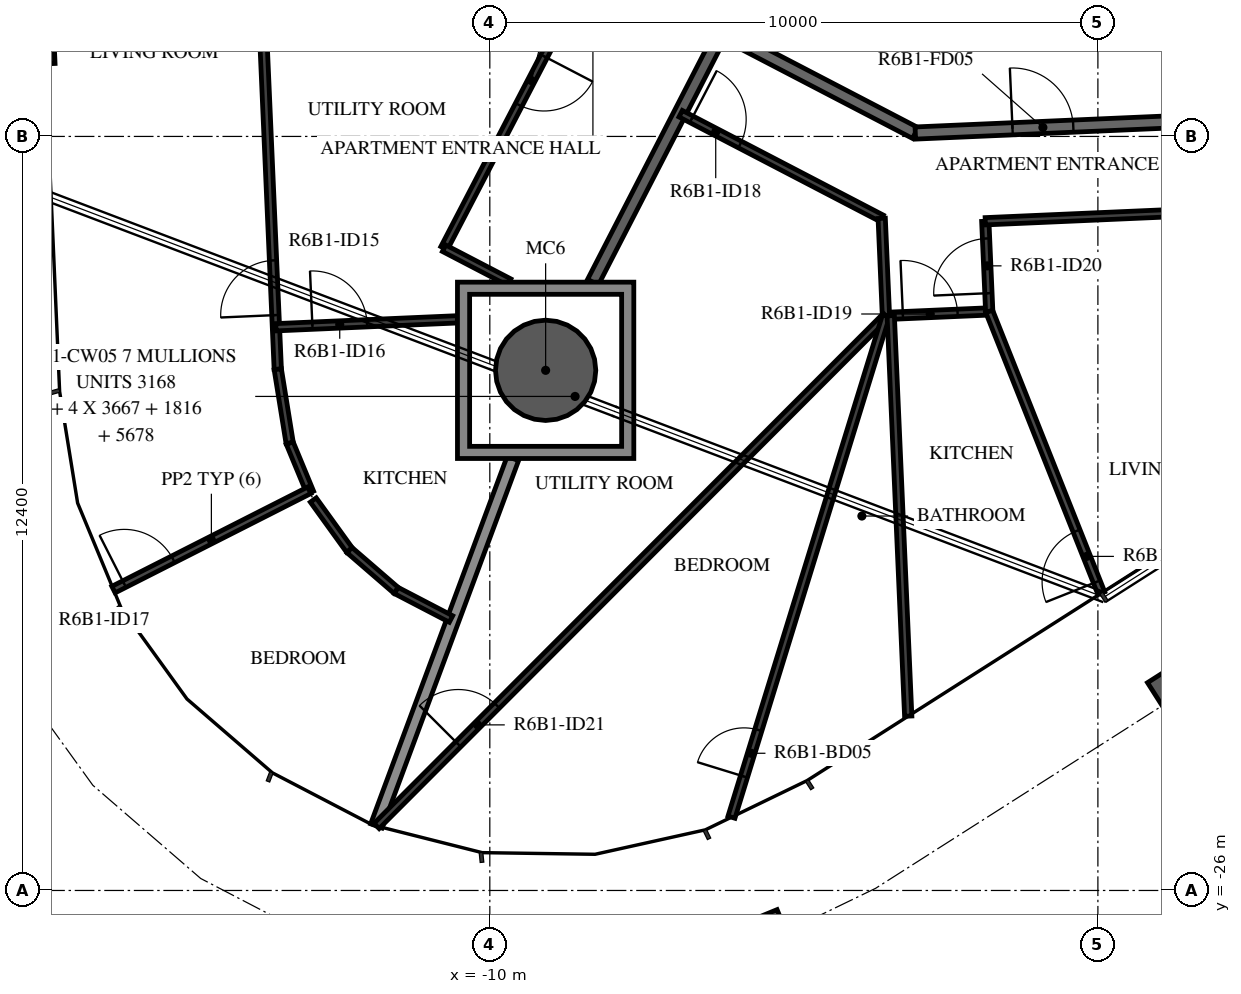
"""IFC4 building model, lengths in metres.
Left out: names, types, materials, properties, quantities, classifications, styles, units other than length and angle.
Written with IfcOpenShell. Run it as: python <this file> out.ifc"""

import sys

from ifc_helpers import new_model, si_unit, direction, frame, frame_2d, origin, origin_2d, place, context, subcontext, project, spatial, polyline, rectangle, hollow_circle, i_section, outline, extrude, element, fill, save


model = new_model("IFC4")
c1 = context("Model", 3, precision=1e-05, world=origin(), true_north=direction((0.0, 1.0)))
c2 = subcontext(c1, "Body", "Model", "MODEL_VIEW")
j1 = project(units=[si_unit("LENGTHUNIT", "METRE"), si_unit("PLANEANGLEUNIT", "RADIAN")], contexts=[c1])
p1 = place(None, origin())
s1 = spatial("IfcSite", under=j1, at=p1, CompositionType="ELEMENT")
p2 = place(p1, origin())
s2 = spatial("IfcBuilding", under=s1, at=p2, CompositionType="ELEMENT")
p3 = place(p2, frame((0.0, 0.0, 237.2)))
s3 = spatial("IfcBuildingStorey", under=s2, at=p3, CompositionType="ELEMENT", Elevation=237.2)
p4 = place(p3, frame((-9.082, -17.446, -0.38), z_axis=(0.0, 0.0, 1.0), x_axis=(1.0, 0.0, 0.0)))
e1 = element("IfcColumn", 1, at=p4, inside=s3, PredefinedType="COLUMN", context=c2, shape_type="SweptSolid", body=[
    extrude(hollow_circle(Radius=0.825, WallThickness=0.04, at=origin_2d()), origin(), (0.0, 0.0, 1.0), 3.5),
])
for number, where, z_axis, x_axis in (
    (2, (-5.243, -26.789, -0.38), (0.0, 0.0, 1.0), (-0.925, -0.38, 0.0)),
    (3, (1.185, -22.881, -0.38), (0.0, 0.0, 1.0), (-0.843, -0.537, 0.0)),
):
    element("IfcColumn", number, at=place(p3, frame(where, z_axis=z_axis, x_axis=x_axis)), inside=s3, PredefinedType="COLUMN", context=c2, shape_type="SweptSolid", body=[
        extrude(i_section(OverallWidth=0.3, OverallDepth=0.9, WebThickness=0.019, FlangeThickness=0.035, FilletRadius=0.03, at=origin_2d()), origin(), (0.0, 0.0, 1.0), 3.5),
    ])
p5 = place(p3, frame((-17.369, -9.207, 0.0), z_axis=(0.0, 0.0, 1.0), x_axis=(0.043639181999, -0.999047357133, 0.0)))
e4 = element("IfcWall", 4, at=p5, inside=s3, PredefinedType="STANDARD", context=c2, shape_type="SweptSolid", body=[
    extrude(rectangle(XDim=3.2, YDim=0.16, at=frame_2d((1.6, 0.0))), origin(), (0.0, 0.0, 1.0), 3.12),
])
p6 = place(p5, frame((0.4, 0.0, 0.0)))
e5 = element("IfcOpeningElement", 5, at=p6, cuts=e4, PredefinedType="OPENING", context=c2, shape_type="SweptSolid", body=[
    extrude(rectangle(XDim=2.4, YDim=2.4, at=frame_2d((1.2, 1.2))), frame((0.0, 0.09, 0.0), z_axis=(0.0, -1.0, 0.0), x_axis=(1.0, 0.0, 0.0)), (0.0, 0.0, 1.0), 0.18),
])
p7 = place(p3, frame((-9.372, -10.228, 0.0), z_axis=(0.0, 0.0, 1.0), x_axis=(0.887005184532, -0.461759464021, 0.0)))
e6 = element("IfcWall", 6, at=p7, inside=s3, PredefinedType="STANDARD", context=c2, shape_type="SweptSolid", body=[
    extrude(rectangle(XDim=7.181, YDim=0.2, at=frame_2d((3.591, 0.0))), origin(), (0.0, 0.0, 1.0), 3.12),
])
p8 = place(p7, frame((2.391, 0.0, 0.0)))
e7 = element("IfcOpeningElement", 7, at=p8, cuts=e6, PredefinedType="OPENING", context=c2, shape_type="SweptSolid", body=[
    extrude(rectangle(XDim=1.0, YDim=2.1, at=frame_2d((0.5, 1.05))), frame((0.0, 0.11, 0.0), z_axis=(0.0, -1.0, 0.0), x_axis=(1.0, 0.0, 0.0)), (0.0, 0.0, 1.0), 0.22),
])
p9 = place(p3, frame((-3.003, -13.544, 0.0), z_axis=(0.0, 0.0, 1.0), x_axis=(0.999048221872, 0.043619380718, 0.0)))
e8 = element("IfcWall", 8, at=p9, inside=s3, PredefinedType="STANDARD", context=c2, shape_type="SweptSolid", body=[
    extrude(rectangle(XDim=6.979, YDim=0.2, at=frame_2d((3.49, 0.0))), origin(), (0.0, 0.0, 1.0), 3.12),
])
p10 = place(p9, frame((1.6, 0.0, 0.0)))
e9 = element("IfcOpeningElement", 9, at=p10, cuts=e8, PredefinedType="OPENING", context=c2, shape_type="SweptSolid", body=[
    extrude(rectangle(XDim=1.0, YDim=2.1, at=frame_2d((0.5, 1.05))), frame((0.0, 0.11, 0.0), z_axis=(0.0, -1.0, 0.0), x_axis=(1.0, 0.0, 0.0)), (0.0, 0.0, 1.0), 0.22),
])
p11 = place(p3, frame((-8.303, -15.996, 0.0), z_axis=(0.0, 0.0, 1.0), x_axis=(0.457702371186, 0.889105471477, 0.0)))
e10 = element("IfcWall", 10, at=p11, inside=s3, PredefinedType="STANDARD", context=c2, shape_type="SweptSolid", body=[
    extrude(rectangle(XDim=4.623, YDim=0.2, at=frame_2d((2.312, 0.0))), origin(), (0.0, 0.0, 1.0), 3.12),
])
p12 = place(p3, frame((-11.865, -24.939, 0.0), z_axis=(0.0, 0.0, 1.0), x_axis=(0.348245485283, 0.937403372076, 0.0)))
e11 = element("IfcWall", 11, at=p12, inside=s3, PredefinedType="STANDARD", context=c2, shape_type="SweptSolid", body=[
    extrude(rectangle(XDim=6.446, YDim=0.2, at=frame_2d((3.223, 0.0))), origin(), (0.0, 0.0, 1.0), 2.73),
])
p13 = place(p3, frame((-13.487, -17.429, 0.0), z_axis=(0.0, 0.0, 1.0), x_axis=(-0.043617336945, 0.999048311103, 0.0)))
e12 = element("IfcWall", 12, at=p13, inside=s3, PredefinedType="PARTITIONING", context=c2, shape_type="SweptSolid", body=[
    extrude(rectangle(XDim=12.941, YDim=0.12, at=frame_2d((6.47, 0.0))), origin(), (0.0, 0.0, 1.0), 3.12),
])
p14 = place(p13, frame((10.749, 0.0, 0.0)))
e13 = element("IfcOpeningElement", 13, at=p14, cuts=e12, PredefinedType="OPENING", context=c2, shape_type="SweptSolid", body=[
    extrude(rectangle(XDim=0.9, YDim=2.1, at=frame_2d((0.45, 1.05))), frame((0.0, 0.07, 0.0), z_axis=(0.0, -1.0, 0.0), x_axis=(1.0, 0.0, 0.0)), (0.0, 0.0, 1.0), 0.14),
])
p15 = place(p13, frame((0.892, 0.0, 0.0)))
e14 = element("IfcOpeningElement", 14, at=p15, cuts=e12, PredefinedType="OPENING", context=c2, shape_type="SweptSolid", body=[
    extrude(rectangle(XDim=0.9, YDim=2.1, at=frame_2d((0.45, 1.05))), frame((0.0, 0.07, 0.0), z_axis=(0.0, -1.0, 0.0), x_axis=(1.0, 0.0, 0.0)), (0.0, 0.0, 1.0), 0.14),
])
p16 = place(p3, frame((-9.016, -12.104, 0.0), z_axis=(0.0, 0.0, 1.0), x_axis=(-0.4617534789, -0.887008300256, 0.0)))
e15 = element("IfcWall", 15, at=p16, inside=s3, PredefinedType="PARTITIONING", context=c2, shape_type="SweptSolid", body=[
    extrude(rectangle(XDim=3.759, YDim=0.12, at=frame_2d((1.88, 0.0))), origin(), (0.0, 0.0, 1.0), 3.12),
])
p17 = place(p16, frame((0.2, 0.0, 0.0)))
e16 = element("IfcOpeningElement", 16, at=p17, cuts=e15, PredefinedType="OPENING", context=c2, shape_type="SweptSolid", body=[
    extrude(rectangle(XDim=0.9, YDim=2.1, at=frame_2d((0.45, 1.05))), frame((0.0, 0.07, 0.0), z_axis=(0.0, -1.0, 0.0), x_axis=(1.0, 0.0, 0.0)), (0.0, 0.0, 1.0), 0.14),
])
p18 = place(p3, frame((-10.752, -15.439, 0.0), z_axis=(0.0, 0.0, 1.0), x_axis=(0.887031383626, -0.461709134048, 0.0)))
e17 = element("IfcWall", 17, at=p18, inside=s3, PredefinedType="PARTITIONING", context=c2, shape_type="SweptSolid", body=[
    extrude(rectangle(XDim=1.208, YDim=0.12, at=frame_2d((0.604, 0.0))), origin(), (0.0, 0.0, 1.0), 3.12),
])
p19 = place(p3, frame((-12.954, -19.456, 0.0), z_axis=(0.0, 0.0, 1.0), x_axis=(-0.382807777256, 0.923828017367, 0.0)))
e18 = element("IfcWall", 18, at=p19, inside=s3, PredefinedType="PARTITIONING", context=c2, shape_type="SweptSolid", body=[
    extrude(rectangle(XDim=0.883, YDim=0.12, at=frame_2d((0.441, 0.0))), origin(), (0.0, 0.0, 1.0), 3.12),
])
p20 = place(p3, frame((-13.292, -18.64, 0.0), z_axis=(0.0, 0.0, 1.0), x_axis=(-0.159363796836, 0.98721992497, 0.0)))
e19 = element("IfcWall", 19, at=p20, inside=s3, PredefinedType="PARTITIONING", context=c2, shape_type="SweptSolid", body=[
    extrude(rectangle(XDim=1.227, YDim=0.12, at=frame_2d((0.614, 0.0))), origin(), (0.0, 0.0, 1.0), 3.12),
])
p21 = place(p3, frame((-16.189, -21.052, 0.0), z_axis=(0.0, 0.0, 1.0), x_axis=(0.891801938239, 0.452426019316, 0.0)))
e20 = element("IfcWall", 20, at=p21, inside=s3, PredefinedType="PARTITIONING", context=c2, shape_type="SweptSolid", body=[
    extrude(rectangle(XDim=3.611, YDim=0.12, at=frame_2d((1.805, 0.0))), origin(), (0.0, 0.0, 1.0), 2.73),
])
p22 = place(p21, frame((0.2, 0.0, 0.0)))
e21 = element("IfcOpeningElement", 21, at=p22, cuts=e20, PredefinedType="OPENING", context=c2, shape_type="SweptSolid", body=[
    extrude(rectangle(XDim=0.9, YDim=2.1, at=frame_2d((0.45, 1.05))), frame((0.0, 0.07, 0.0), z_axis=(0.0, -1.0, 0.0), x_axis=(1.0, 0.0, 0.0)), (0.0, 0.0, 1.0), 0.14),
])
p23 = place(p3, frame((-13.517, -16.738, 0.0), z_axis=(0.0, 0.0, 1.0), x_axis=(0.999047660155, 0.043632244256, 0.0)))
e22 = element("IfcWall", 22, at=p23, inside=s3, PredefinedType="PARTITIONING", context=c2, shape_type="SweptSolid", body=[
    extrude(rectangle(XDim=2.988, YDim=0.12, at=frame_2d((1.494, 0.0))), origin(), (0.0, 0.0, 1.0), 3.12),
])
p24 = place(p23, frame((0.6, 0.0, 0.0)))
e23 = element("IfcOpeningElement", 23, at=p24, cuts=e22, PredefinedType="OPENING", context=c2, shape_type="SweptSolid", body=[
    extrude(rectangle(XDim=0.9, YDim=2.1, at=frame_2d((0.45, 1.05))), frame((0.0, 0.07, 0.0), z_axis=(0.0, -1.0, 0.0), x_axis=(1.0, 0.0, 0.0)), (0.0, 0.0, 1.0), 0.14),
])
for number, where, z_axis, x_axis in (
    (24, (-12.903, -19.579, 0.0), (0.0, 0.0, 1.0), (0.585, -0.811, 0.0)),
    (25, (-12.308, -20.402, 0.0), (0.0, 0.0, 1.0), (0.757, -0.654, 0.0)),
    (26, (-11.539, -21.067, 0.0), (0.0, 0.0, 1.0), (0.887, -0.462, 0.0)),
):
    element("IfcWall", number, at=place(p3, frame(where, z_axis=z_axis, x_axis=x_axis)), inside=s3, PredefinedType="PARTITIONING", context=c2, shape_type="SweptSolid", body=[
        extrude(rectangle(XDim=1.016, YDim=0.12, at=frame_2d((0.508, 0.0))), origin(), (0.0, 0.0, 1.0), 3.12),
    ])
p25 = place(p3, frame((-6.861, -13.226, 0.0), z_axis=(0.0, 0.0, 1.0), x_axis=(0.887010791097, -0.461748694073, 0.0)))
e27 = element("IfcWall", 27, at=p25, inside=s3, PredefinedType="PARTITIONING", context=c2, shape_type="SweptSolid", body=[
    extrude(rectangle(XDim=3.727, YDim=0.12, at=frame_2d((1.864, 0.0))), origin(), (0.0, 0.0, 1.0), 3.12),
])
p26 = place(p25, frame((0.2, 0.0, 0.0)))
e28 = element("IfcOpeningElement", 28, at=p26, cuts=e27, PredefinedType="OPENING", context=c2, shape_type="SweptSolid", body=[
    extrude(rectangle(XDim=0.9, YDim=2.1, at=frame_2d((0.45, 1.05))), frame((0.0, 0.07, 0.0), z_axis=(0.0, -1.0, 0.0), x_axis=(1.0, 0.0, 0.0)), (0.0, 0.0, 1.0), 0.14),
])
p27 = place(p3, frame((-3.555, -14.947, 0.0), z_axis=(0.0, 0.0, 1.0), x_axis=(0.043470204022, -0.999054723908, 0.0)))
e29 = element("IfcWall", 29, at=p27, inside=s3, PredefinedType="PARTITIONING", context=c2, shape_type="SweptSolid", body=[
    extrude(rectangle(XDim=1.606, YDim=0.12, at=frame_2d((0.803, 0.0))), origin(), (0.0, 0.0, 1.0), 3.12),
])
p28 = place(p3, frame((-3.407, -16.548, 0.0), z_axis=(0.0, 0.0, 1.0), x_axis=(0.999045901572, 0.043672491929, 0.0)))
e30 = element("IfcWall", 30, at=p28, inside=s3, PredefinedType="PARTITIONING", context=c2, shape_type="SweptSolid", body=[
    extrude(rectangle(XDim=1.621, YDim=0.12, at=frame_2d((0.811, 0.0))), origin(), (0.0, 0.0, 1.0), 3.12),
])
p29 = place(p28, frame((0.2, 0.0, 0.0)))
e31 = element("IfcOpeningElement", 31, at=p29, cuts=e30, PredefinedType="OPENING", context=c2, shape_type="SweptSolid", body=[
    extrude(rectangle(XDim=0.9, YDim=2.1, at=frame_2d((0.45, 1.05))), frame((0.0, 0.07, 0.0), z_axis=(0.0, -1.0, 0.0), x_axis=(1.0, 0.0, 0.0)), (0.0, 0.0, 1.0), 0.14),
])
p30 = place(p3, frame((-1.787, -16.478, 0.0), z_axis=(0.0, 0.0, 1.0), x_axis=(-0.043601447011, 0.999049004713, 0.0)))
e32 = element("IfcWall", 32, at=p30, inside=s3, PredefinedType="PARTITIONING", context=c2, shape_type="SweptSolid", body=[
    extrude(rectangle(XDim=1.484, YDim=0.12, at=frame_2d((0.742, 0.0))), origin(), (0.0, 0.0, 1.0), 3.12),
])
p31 = place(p30, frame((0.3, 0.0, 0.0)))
e33 = element("IfcOpeningElement", 33, at=p31, cuts=e32, PredefinedType="OPENING", context=c2, shape_type="SweptSolid", body=[
    extrude(rectangle(XDim=0.9, YDim=2.1, at=frame_2d((0.45, 1.05))), frame((0.0, 0.07, 0.0), z_axis=(0.0, -1.0, 0.0), x_axis=(1.0, 0.0, 0.0)), (0.0, 0.0, 1.0), 0.14),
])
p32 = place(p3, frame((-1.852, -14.995, 0.0), z_axis=(0.0, 0.0, 1.0), x_axis=(0.999047773092, 0.043629658249, 0.0)))
e34 = element("IfcWall", 34, at=p32, inside=s3, PredefinedType="PARTITIONING", context=c2, shape_type="SweptSolid", body=[
    extrude(rectangle(XDim=6.497, YDim=0.12, at=frame_2d((3.248, 0.0))), origin(), (0.0, 0.0, 1.0), 3.12),
])
p33 = place(p3, frame((-11.862, -24.94, 0.0), z_axis=(0.0, 0.0, 1.0), x_axis=(0.70663293894, 0.707580306117, 0.0)))
e35 = element("IfcWall", 35, at=p33, inside=s3, PredefinedType="PARTITIONING", context=c2, shape_type="SweptSolid", body=[
    extrude(rectangle(XDim=11.854, YDim=0.12, at=frame_2d((5.927, 0.0))), origin(), (0.0, 0.0, 1.0), 3.12),
])
p34 = place(p33, frame((1.9, 0.0, 0.0)))
e36 = element("IfcOpeningElement", 36, at=p34, cuts=e35, PredefinedType="OPENING", context=c2, shape_type="SweptSolid", body=[
    extrude(rectangle(XDim=0.9, YDim=2.1, at=frame_2d((0.45, 1.05))), frame((0.0, 0.07, 0.0), z_axis=(0.0, -1.0, 0.0), x_axis=(1.0, 0.0, 0.0)), (0.0, 0.0, 1.0), 0.14),
])
p35 = place(p3, frame((-6.026, -24.795, 0.0), z_axis=(0.0, 0.0, 1.0), x_axis=(0.294501505058, 0.955651015548, 0.0)))
e37 = element("IfcWall", 37, at=p35, inside=s3, PredefinedType="PARTITIONING", context=c2, shape_type="SweptSolid", body=[
    extrude(rectangle(XDim=8.626, YDim=0.12, at=frame_2d((4.313, 0.0))), origin(), (0.0, 0.0, 1.0), 3.12),
])
p36 = place(p35, frame((0.7, 0.0, 0.0)))
e38 = element("IfcOpeningElement", 38, at=p36, cuts=e37, PredefinedType="OPENING", context=c2, shape_type="SweptSolid", body=[
    extrude(rectangle(XDim=0.8, YDim=2.1, at=frame_2d((0.4, 1.05))), frame((0.0, 0.07, 0.0), z_axis=(0.0, -1.0, 0.0), x_axis=(1.0, 0.0, 0.0)), (0.0, 0.0, 1.0), 0.14),
])
p37 = place(p3, frame((-3.119, -23.133, 0.0), z_axis=(0.0, 0.0, 1.0), x_axis=(-0.043633326708, 0.99904761288, 0.0)))
e39 = element("IfcWall", 39, at=p37, inside=s3, PredefinedType="PARTITIONING", context=c2, shape_type="SweptSolid", body=[
    extrude(rectangle(XDim=6.591, YDim=0.12, at=frame_2d((3.296, 0.0))), origin(), (0.0, 0.0, 1.0), 3.12),
])
p38 = place(p3, frame((0.056, -21.11, 0.0), z_axis=(0.0, 0.0, 1.0), x_axis=(-0.369701541807, 0.929150563679, 0.0)))
e40 = element("IfcWall", 40, at=p38, inside=s3, PredefinedType="PARTITIONING", context=c2, shape_type="SweptSolid", body=[
    extrude(rectangle(XDim=4.986, YDim=0.12, at=frame_2d((2.493, 0.0))), origin(), (0.0, 0.0, 1.0), 2.73),
])
p39 = place(p38, frame((0.2, 0.0, 0.0)))
e41 = element("IfcOpeningElement", 41, at=p39, cuts=e40, PredefinedType="OPENING", context=c2, shape_type="SweptSolid", body=[
    extrude(rectangle(XDim=0.9, YDim=2.1, at=frame_2d((0.45, 1.05))), frame((0.0, 0.07, 0.0), z_axis=(0.0, -1.0, 0.0), x_axis=(1.0, 0.0, 0.0)), (0.0, 0.0, 1.0), 0.14),
])
p40 = place(p3, origin())
e42 = element("IfcWall", 42, at=p40, inside=s3, PredefinedType="STANDARD", context=c2, shape_type="SweptSolid", body=[
    extrude(outline(polyline([(-7.632, -15.996), (-7.632, -18.896), (-10.532, -18.896), (-10.532, -15.996), (-7.632, -15.996)]), holes=[polyline([(-10.332, -18.696), (-7.832, -18.696), (-7.832, -16.196), (-10.332, -16.196), (-10.332, -18.696)])]), origin(), (0.0, 0.0, 1.0), 3.12),
])
p41 = place(p17, origin())
e43 = element("IfcDoor", 43, at=p41, inside=s3, OperationType="SINGLE_SWING_RIGHT", PredefinedType="DOOR", context=c2, shape_type="SweptSolid", body=[
    extrude(rectangle(XDim=0.9, YDim=2.1, at=frame_2d((0.45, 1.05))), frame((0.0, 0.025, 0.0), z_axis=(0.0, -1.0, 0.0), x_axis=(1.0, 0.0, 0.0)), (0.0, 0.0, 1.0), 0.05),
])
fill(e16, e43)
p42 = place(p15, origin())
e44 = element("IfcDoor", 44, at=p42, inside=s3, OperationType="SINGLE_SWING_RIGHT", PredefinedType="DOOR", context=c2, shape_type="SweptSolid", body=[
    extrude(rectangle(XDim=0.9, YDim=2.1, at=frame_2d((0.45, 1.05))), frame((0.0, 0.025, 0.0), z_axis=(0.0, -1.0, 0.0), x_axis=(1.0, 0.0, 0.0)), (0.0, 0.0, 1.0), 0.05),
])
fill(e14, e44)
p43 = place(p24, origin())
e45 = element("IfcDoor", 45, at=p43, inside=s3, OperationType="SINGLE_SWING_RIGHT", PredefinedType="DOOR", context=c2, shape_type="SweptSolid", body=[
    extrude(rectangle(XDim=0.9, YDim=2.1, at=frame_2d((0.45, 1.05))), frame((0.0, 0.025, 0.0), z_axis=(0.0, -1.0, 0.0), x_axis=(1.0, 0.0, 0.0)), (0.0, 0.0, 1.0), 0.05),
])
fill(e23, e45)
p44 = place(p22, origin())
e46 = element("IfcDoor", 46, at=p44, inside=s3, OperationType="SINGLE_SWING_RIGHT", PredefinedType="DOOR", context=c2, shape_type="SweptSolid", body=[
    extrude(rectangle(XDim=0.9, YDim=2.1, at=frame_2d((0.45, 1.05))), frame((0.0, 0.025, 0.0), z_axis=(0.0, -1.0, 0.0), x_axis=(1.0, 0.0, 0.0)), (0.0, 0.0, 1.0), 0.05),
])
fill(e21, e46)
p45 = place(p10, origin())
e47 = element("IfcDoor", 47, at=p45, inside=s3, OperationType="SINGLE_SWING_LEFT", PredefinedType="DOOR", context=c2, shape_type="SweptSolid", body=[
    extrude(rectangle(XDim=1.0, YDim=2.1, at=frame_2d((0.5, 1.05))), frame((0.0, 0.025, 0.0), z_axis=(0.0, -1.0, 0.0), x_axis=(1.0, 0.0, 0.0)), (0.0, 0.0, 1.0), 0.05),
])
fill(e9, e47)
p46 = place(p26, origin())
e48 = element("IfcDoor", 48, at=p46, inside=s3, OperationType="SINGLE_SWING_LEFT", PredefinedType="DOOR", context=c2, shape_type="SweptSolid", body=[
    extrude(rectangle(XDim=0.9, YDim=2.1, at=frame_2d((0.45, 1.05))), frame((0.0, 0.025, 0.0), z_axis=(0.0, -1.0, 0.0), x_axis=(1.0, 0.0, 0.0)), (0.0, 0.0, 1.0), 0.05),
])
fill(e28, e48)
p47 = place(p29, origin())
e49 = element("IfcDoor", 49, at=p47, inside=s3, OperationType="SINGLE_SWING_LEFT", PredefinedType="DOOR", context=c2, shape_type="SweptSolid", body=[
    extrude(rectangle(XDim=0.9, YDim=2.1, at=frame_2d((0.45, 1.05))), frame((0.0, 0.025, 0.0), z_axis=(0.0, -1.0, 0.0), x_axis=(1.0, 0.0, 0.0)), (0.0, 0.0, 1.0), 0.05),
])
fill(e31, e49)
p48 = place(p31, origin())
e50 = element("IfcDoor", 50, at=p48, inside=s3, OperationType="SINGLE_SWING_LEFT", PredefinedType="DOOR", context=c2, shape_type="SweptSolid", body=[
    extrude(rectangle(XDim=0.9, YDim=2.1, at=frame_2d((0.45, 1.05))), frame((0.0, 0.025, 0.0), z_axis=(0.0, -1.0, 0.0), x_axis=(1.0, 0.0, 0.0)), (0.0, 0.0, 1.0), 0.05),
])
fill(e33, e50)
p49 = place(p34, origin())
e51 = element("IfcDoor", 51, at=p49, inside=s3, OperationType="SINGLE_SWING_RIGHT", PredefinedType="DOOR", context=c2, shape_type="SweptSolid", body=[
    extrude(rectangle(XDim=0.9, YDim=2.1, at=frame_2d((0.45, 1.05))), frame((0.0, 0.025, 0.0), z_axis=(0.0, -1.0, 0.0), x_axis=(1.0, 0.0, 0.0)), (0.0, 0.0, 1.0), 0.05),
])
fill(e36, e51)
p50 = place(p36, origin())
e52 = element("IfcDoor", 52, at=p50, inside=s3, OperationType="SINGLE_SWING_RIGHT", PredefinedType="DOOR", context=c2, shape_type="SweptSolid", body=[
    extrude(rectangle(XDim=0.8, YDim=2.1, at=frame_2d((0.4, 1.05))), frame((0.0, 0.025, 0.0), z_axis=(0.0, -1.0, 0.0), x_axis=(1.0, 0.0, 0.0)), (0.0, 0.0, 1.0), 0.05),
])
fill(e38, e52)
p51 = place(p39, origin())
e53 = element("IfcDoor", 53, at=p51, inside=s3, OperationType="SINGLE_SWING_LEFT", PredefinedType="DOOR", context=c2, shape_type="SweptSolid", body=[
    extrude(rectangle(XDim=0.9, YDim=2.1, at=frame_2d((0.45, 1.05))), frame((0.0, 0.025, 0.0), z_axis=(0.0, -1.0, 0.0), x_axis=(1.0, 0.0, 0.0)), (0.0, 0.0, 1.0), 0.05),
])
fill(e41, e53)
save(model, sys.argv[1])
